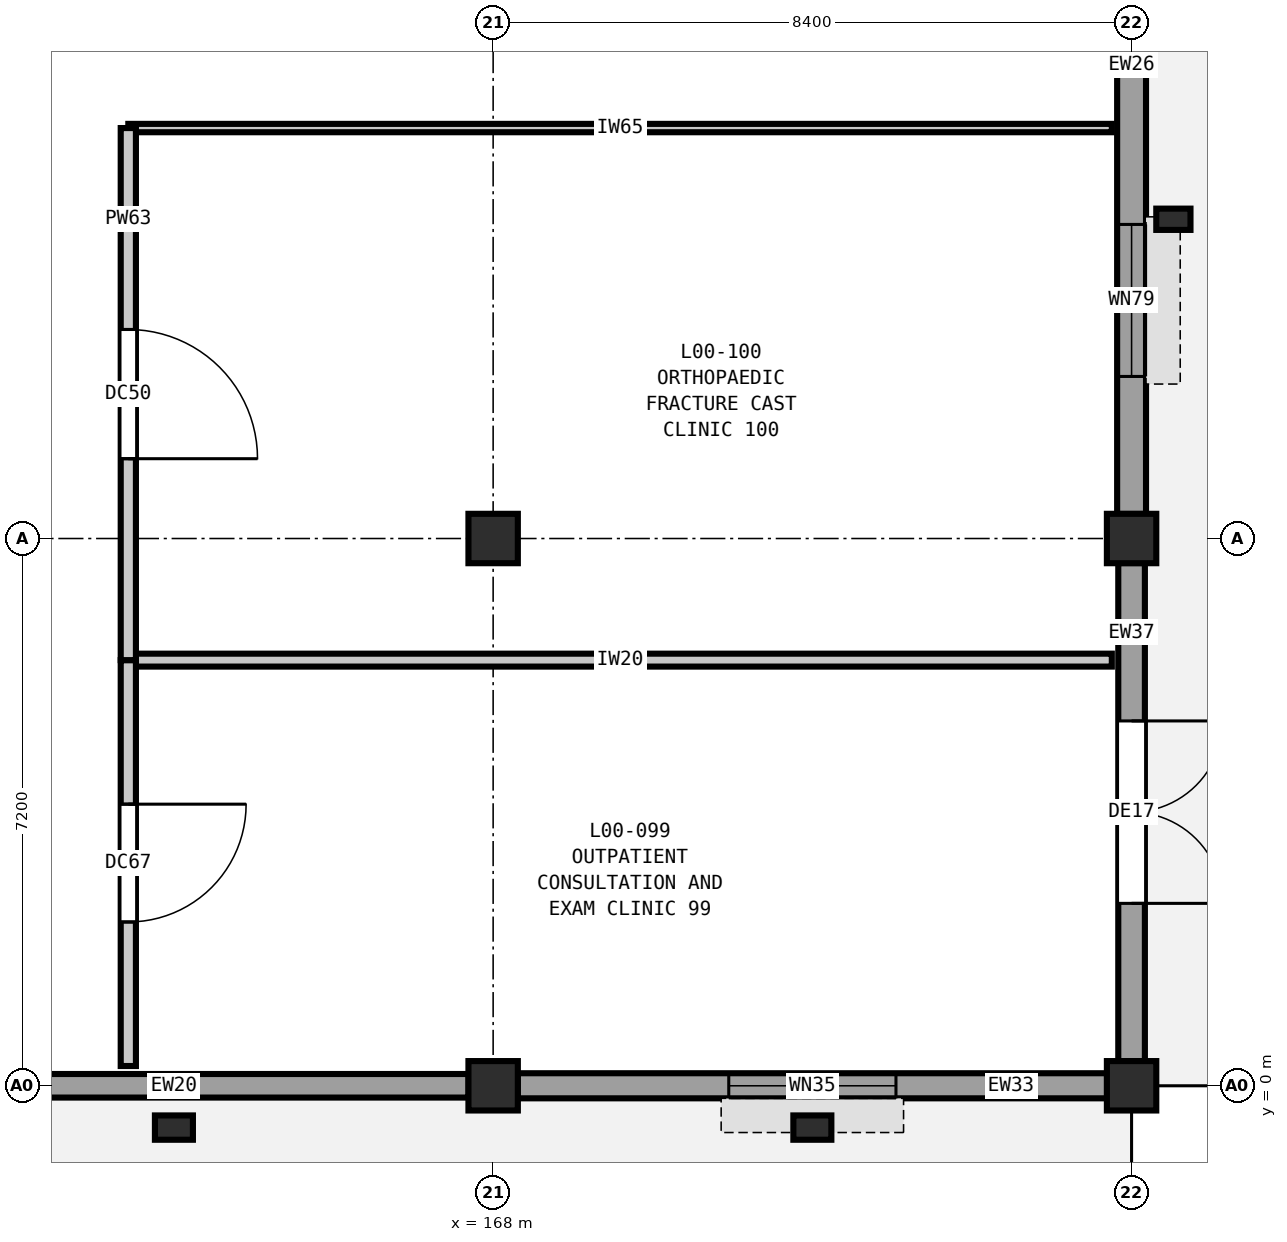
"""IFC4 building model, lengths in metres.
Left out: names, types, materials, properties, quantities, classifications, styles, units other than length and angle.
Written with IfcOpenShell. Run it as: python <this file> out.ifc"""

import sys

from ifc_helpers import new_model, si_unit, direction, frame, frame_2d, origin, origin_2d, place, context, subcontext, project, spatial, rectangle, extrude, element, fill, save


model = new_model("IFC4")
c1 = context("Model", 3, precision=1e-05, world=origin(), true_north=direction((0.0, 1.0)))
c2 = subcontext(c1, "Body", "Model", "MODEL_VIEW")
j1 = project(units=[si_unit("LENGTHUNIT", "METRE"), si_unit("PLANEANGLEUNIT", "RADIAN")], contexts=[c1])
p1 = place(None, origin())
s1 = spatial("IfcSite", under=j1, at=p1, CompositionType="ELEMENT")
p2 = place(p1, origin())
s2 = spatial("IfcBuilding", under=s1, at=p2, CompositionType="ELEMENT")
p3 = place(p2, origin())
s3 = spatial("IfcBuildingStorey", under=s2, at=p3, CompositionType="ELEMENT", Elevation=0.0)
for number, where, z_axis, x_axis in (
    (1, (168.0, 0.0, 0.0), (0.0, 0.0, 1.0), (1.0, 0.0, 0.0)),
    (2, (168.0, 7.2, 0.0), (0.0, 0.0, 1.0), (1.0, 0.0, 0.0)),
    (3, (176.4, 0.0, 0.0), (0.0, 0.0, 1.0), (1.0, 0.0, 0.0)),
    (4, (176.4, 7.2, 0.0), (0.0, 0.0, 1.0), (1.0, 0.0, 0.0)),
):
    element("IfcColumn", number, at=place(p3, frame(where, z_axis=z_axis, x_axis=x_axis)), inside=s3, PredefinedType="COLUMN", context=c2, shape_type="SweptSolid", body=[
        extrude(rectangle(XDim=0.65, YDim=0.65, at=origin_2d()), origin(), (0.0, 0.0, 1.0), 5.4),
    ])
for number, where, z_axis, x_axis in (
    (5, (163.8, -0.55, 0.0), (0.0, 0.0, 1.0), (1.0, 0.0, 0.0)),
    (6, (172.2, -0.55, 0.0), (0.0, 0.0, 1.0), (1.0, 0.0, 0.0)),
):
    element("IfcColumn", number, at=place(p3, frame(where, z_axis=z_axis, x_axis=x_axis)), inside=s3, PredefinedType="PILASTER", context=c2, shape_type="SweptSolid", body=[
        extrude(rectangle(XDim=0.5, YDim=0.32, at=origin_2d()), origin(), (0.0, 0.0, 1.0), 5.4),
    ])
p4 = place(p3, frame((176.95, 11.4, 0.0), z_axis=(0.0, 0.0, 1.0), x_axis=(1.0, 0.0, 0.0)))
e7 = element("IfcColumn", 7, at=p4, inside=s3, PredefinedType="PILASTER", context=c2, shape_type="SweptSolid", body=[
    extrude(rectangle(XDim=0.45, YDim=0.28, at=origin_2d()), origin(), (0.0, 0.0, 1.0), 5.4),
])
p5 = place(p3, frame((176.4, 15.277, 0.0), z_axis=(0.0, 0.0, 1.0), x_axis=(0.0, -1.0, 0.0)))
e8 = element("IfcWall", 8, at=p5, inside=s3, PredefinedType="SOLIDWALL", context=c2, shape_type="SweptSolid", body=[
    extrude(rectangle(XDim=7.754, YDim=0.38, at=frame_2d((3.877, 0.0))), origin(), (0.0, 0.0, 1.0), 4.68),
])
p6 = place(p5, frame((3.945, 0.0, 0.9)))
e9 = element("IfcOpeningElement", 9, at=p6, cuts=e8, PredefinedType="OPENING", context=c2, shape_type="SweptSolid", body=[
    extrude(rectangle(XDim=2.0, YDim=1.95, at=frame_2d((1.0, 0.975))), frame((0.0, 0.2, 0.0), z_axis=(0.0, -1.0, 0.0), x_axis=(1.0, 0.0, 0.0)), (0.0, 0.0, 1.0), 0.4),
])
p7 = place(p3, frame((176.4, 6.877, 0.0), z_axis=(0.0, 0.0, 1.0), x_axis=(0.0, -1.0, 0.0)))
e10 = element("IfcWall", 10, at=p7, inside=s3, PredefinedType="SOLIDWALL", context=c2, shape_type="SweptSolid", body=[
    extrude(rectangle(XDim=6.554, YDim=0.35, at=frame_2d((3.277, 0.0))), origin(), (0.0, 0.0, 1.0), 4.68),
])
p8 = place(p7, frame((2.077, 0.0, 0.0)))
e11 = element("IfcOpeningElement", 11, at=p8, cuts=e10, PredefinedType="OPENING", context=c2, shape_type="SweptSolid", body=[
    extrude(rectangle(XDim=2.4, YDim=2.6, at=frame_2d((1.2, 1.3))), frame((0.0, 0.185, 0.0), z_axis=(0.0, -1.0, 0.0), x_axis=(1.0, 0.0, 0.0)), (0.0, 0.0, 1.0), 0.37),
])
p9 = place(p3, frame((176.077, 0.0, 0.0), z_axis=(0.0, 0.0, 1.0), x_axis=(-1.0, 0.0, 0.0)))
e12 = element("IfcWall", 12, at=p9, inside=s3, PredefinedType="SOLIDWALL", context=c2, shape_type="SweptSolid", body=[
    extrude(rectangle(XDim=7.754, YDim=0.33, at=frame_2d((3.877, 0.0))), origin(), (0.0, 0.0, 1.0), 4.68),
])
p10 = place(p9, frame((2.777, 0.0, 0.9)))
e13 = element("IfcOpeningElement", 13, at=p10, cuts=e12, PredefinedType="OPENING", context=c2, shape_type="SweptSolid", body=[
    extrude(rectangle(XDim=2.2, YDim=1.95, at=frame_2d((1.1, 0.975))), frame((0.0, 0.175, 0.0), z_axis=(0.0, -1.0, 0.0), x_axis=(1.0, 0.0, 0.0)), (0.0, 0.0, 1.0), 0.35),
])
p11 = place(p3, frame((167.677, 0.0, 0.0), z_axis=(0.0, 0.0, 1.0), x_axis=(-1.0, 0.0, 0.0)))
e14 = element("IfcWall", 14, at=p11, inside=s3, PredefinedType="SOLIDWALL", context=c2, shape_type="SweptSolid", body=[
    extrude(rectangle(XDim=7.754, YDim=0.31, at=frame_2d((3.877, 0.0))), origin(), (0.0, 0.0, 1.0), 4.68),
])
p12 = place(p3, frame((163.2, 5.6, 0.0), z_axis=(0.0, 0.0, 1.0), x_axis=(1.0, 0.0, 0.0)))
e15 = element("IfcWall", 15, at=p12, inside=s3, PredefinedType="PARTITIONING", context=c2, shape_type="SweptSolid", body=[
    extrude(rectangle(XDim=12.94, YDim=0.17, at=frame_2d((6.47, 0.0))), origin(), (0.0, 0.0, 1.0), 5.04),
])
p13 = place(p3, frame((163.2, 12.6, 0.0), z_axis=(0.0, 0.0, 1.0), x_axis=(1.0, 0.0, 0.0)))
e16 = element("IfcWall", 16, at=p13, inside=s3, PredefinedType="PARTITIONING", context=c2, shape_type="SweptSolid", body=[
    extrude(rectangle(XDim=12.94, YDim=0.11, at=frame_2d((6.47, 0.0))), origin(), (0.0, 0.0, 1.0), 5.04),
])
p14 = place(p3, frame((163.2, 0.26, 0.0), z_axis=(0.0, 0.0, 1.0), x_axis=(0.0, 1.0, 0.0)))
e17 = element("IfcWall", 17, at=p14, inside=s3, PredefinedType="PARTITIONING", context=c2, shape_type="SweptSolid", body=[
    extrude(rectangle(XDim=5.34, YDim=0.2, at=frame_2d((2.67, 0.0))), origin(), (0.0, 0.0, 1.0), 5.04),
])
p15 = place(p14, frame((1.895, 0.0, 0.0)))
e18 = element("IfcOpeningElement", 18, at=p15, cuts=e17, PredefinedType="OPENING", context=c2, shape_type="SweptSolid", body=[
    extrude(rectangle(XDim=1.55, YDim=2.25, at=frame_2d((0.775, 1.125))), frame((0.0, 0.11, 0.0), z_axis=(0.0, -1.0, 0.0), x_axis=(1.0, 0.0, 0.0)), (0.0, 0.0, 1.0), 0.22),
])
p16 = place(p3, frame((163.2, 5.6, 0.0), z_axis=(0.0, 0.0, 1.0), x_axis=(0.0, 1.0, 0.0)))
e19 = element("IfcWall", 19, at=p16, inside=s3, PredefinedType="PARTITIONING", context=c2, shape_type="SweptSolid", body=[
    extrude(rectangle(XDim=7.0, YDim=0.2, at=frame_2d((3.5, 0.0))), origin(), (0.0, 0.0, 1.0), 5.04),
])
p17 = place(p16, frame((2.65, 0.0, 0.0)))
e20 = element("IfcOpeningElement", 20, at=p17, cuts=e19, PredefinedType="OPENING", context=c2, shape_type="SweptSolid", body=[
    extrude(rectangle(XDim=1.7, YDim=2.3, at=frame_2d((0.85, 1.15))), frame((0.0, 0.11, 0.0), z_axis=(0.0, -1.0, 0.0), x_axis=(1.0, 0.0, 0.0)), (0.0, 0.0, 1.0), 0.22),
])
p18 = place(p6, origin())
e21 = element("IfcWindow", 21, at=p18, inside=s3, PartitioningType="DOUBLE_PANEL_VERTICAL", PredefinedType="WINDOW", context=c2, shape_type="SweptSolid", body=[
    extrude(rectangle(XDim=2.0, YDim=1.95, at=frame_2d((1.0, 0.975))), frame((0.0, 0.03, 0.0), z_axis=(0.0, -1.0, 0.0), x_axis=(1.0, 0.0, 0.0)), (0.0, 0.0, 1.0), 0.06),
])
fill(e9, e21)
p19 = place(p8, origin())
e22 = element("IfcDoor", 22, at=p19, inside=s3, OperationType="DOUBLE_DOOR_SINGLE_SWING", PredefinedType="DOOR", context=c2, shape_type="SweptSolid", body=[
    extrude(rectangle(XDim=2.4, YDim=2.6, at=frame_2d((1.2, 1.3))), frame((0.0, 0.025, 0.0), z_axis=(0.0, -1.0, 0.0), x_axis=(1.0, 0.0, 0.0)), (0.0, 0.0, 1.0), 0.05),
])
fill(e11, e22)
p20 = place(p10, origin())
e23 = element("IfcWindow", 23, at=p20, inside=s3, PartitioningType="DOUBLE_PANEL_VERTICAL", PredefinedType="WINDOW", context=c2, shape_type="SweptSolid", body=[
    extrude(rectangle(XDim=2.2, YDim=1.95, at=frame_2d((1.1, 0.975))), frame((0.0, 0.03, 0.0), z_axis=(0.0, -1.0, 0.0), x_axis=(1.0, 0.0, 0.0)), (0.0, 0.0, 1.0), 0.06),
])
fill(e13, e23)
p21 = place(p15, frame((1.55, 0.0, 0.0), z_axis=(0.0, 0.0, 1.0), x_axis=(-1.0, 0.0, 0.0)))
e24 = element("IfcDoor", 24, at=p21, inside=s3, OperationType="SINGLE_SWING_LEFT", PredefinedType="DOOR", context=c2, shape_type="SweptSolid", body=[
    extrude(rectangle(XDim=1.55, YDim=2.25, at=frame_2d((0.775, 1.125))), frame((0.0, 0.025, 0.0), z_axis=(0.0, -1.0, 0.0), x_axis=(1.0, 0.0, 0.0)), (0.0, 0.0, 1.0), 0.05),
])
fill(e18, e24)
p22 = place(p17, frame((1.7, 0.0, 0.0), z_axis=(0.0, 0.0, 1.0), x_axis=(-1.0, 0.0, 0.0)))
e25 = element("IfcDoor", 25, at=p22, inside=s3, OperationType="SINGLE_SWING_RIGHT", PredefinedType="DOOR", context=c2, shape_type="SweptSolid", body=[
    extrude(rectangle(XDim=1.7, YDim=2.3, at=frame_2d((0.85, 1.15))), frame((0.0, 0.025, 0.0), z_axis=(0.0, -1.0, 0.0), x_axis=(1.0, 0.0, 0.0)), (0.0, 0.0, 1.0), 0.05),
])
fill(e20, e25)
save(model, sys.argv[1])
